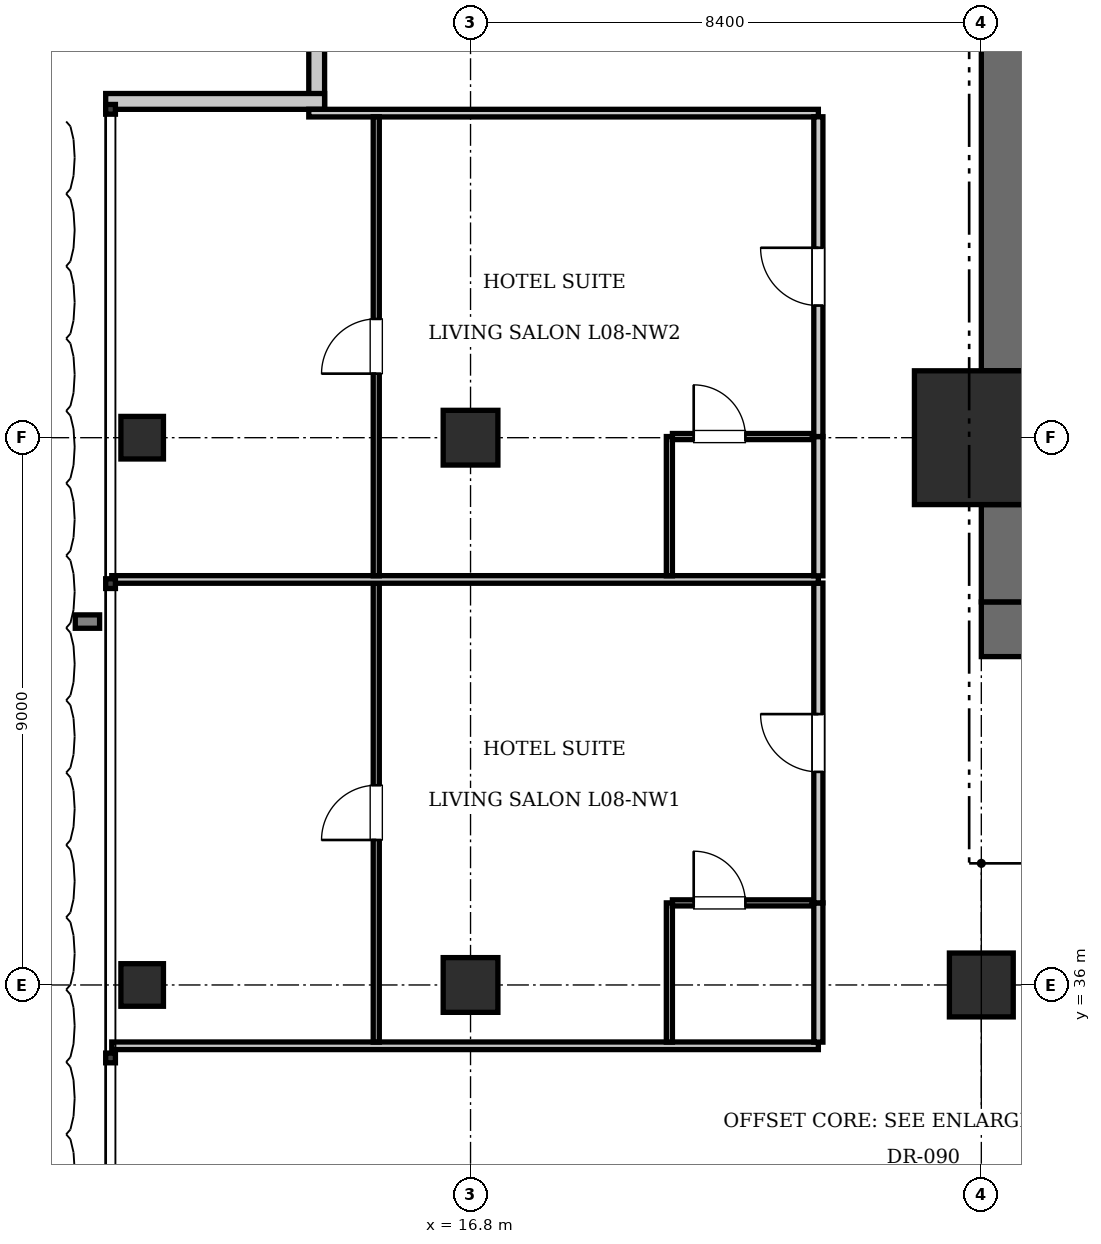
"""IFC4 building model, lengths in metres.
Left out: names, types, materials, properties, quantities, classifications, styles, units other than length and angle.
Written with IfcOpenShell. Run it as: python <this file> out.ifc"""

import sys

from ifc_helpers import new_model, si_unit, direction, frame, frame_2d, origin, origin_2d, place, context, subcontext, project, spatial, rectangle, i_section, extrude, element, fill, save


model = new_model("IFC4")
c1 = context("Model", 3, precision=1e-05, world=origin(), true_north=direction((0.0, 1.0)))
c2 = subcontext(c1, "Body", "Model", "MODEL_VIEW")
j1 = project(units=[si_unit("LENGTHUNIT", "METRE"), si_unit("PLANEANGLEUNIT", "RADIAN")], contexts=[c1])
p1 = place(None, origin())
s1 = spatial("IfcSite", under=j1, at=p1, CompositionType="ELEMENT")
p2 = place(p1, origin())
s2 = spatial("IfcBuilding", under=s1, at=p2, CompositionType="ELEMENT")
p3 = place(p2, frame((0.0, 0.0, 38.5)))
s3 = spatial("IfcBuildingStorey", under=s2, at=p3, CompositionType="ELEMENT", Elevation=38.5)
p4 = place(p3, frame((25.2, 45.0, 0.0), z_axis=(0.0, 0.0, 1.0), x_axis=(1.0, 0.0, 0.0)))
e1 = element("IfcColumn", 1, at=p4, inside=s3, PredefinedType="COLUMN", context=c2, shape_type="SweptSolid", body=[
    extrude(rectangle(XDim=2.2, YDim=2.2, at=origin_2d()), origin(), (0.0, 0.0, 1.0), 3.85),
])
p5 = place(p3, frame((25.2, 41.85, 0.0), z_axis=(0.0, 0.0, 1.0), x_axis=(1.0, 0.0, 0.0)))
e2 = element("IfcWall", 2, at=p5, inside=s3, PredefinedType="SHEAR", context=c2, shape_type="SweptSolid", body=[
    extrude(rectangle(XDim=6.8, YDim=0.9, at=frame_2d((3.4, 0.0))), origin(), (0.0, 0.0, 1.0), 3.85),
])
p6 = place(p5, frame((1.65, 0.0, 0.0)))
e3 = element("IfcOpeningElement", 3, at=p6, cuts=e2, PredefinedType="OPENING", context=c2, shape_type="SweptSolid", body=[
    extrude(rectangle(XDim=1.15, YDim=2.15, at=frame_2d((0.575, 1.075))), frame((0.0, 0.46, 0.0), z_axis=(0.0, -1.0, 0.0), x_axis=(1.0, 0.0, 0.0)), (0.0, 0.0, 1.0), 0.92),
])
p7 = place(p5, frame((5.15, 0.0, 0.0)))
e4 = element("IfcOpeningElement", 4, at=p7, cuts=e2, PredefinedType="OPENING", context=c2, shape_type="SweptSolid", body=[
    extrude(rectangle(XDim=1.1, YDim=2.2, at=frame_2d((0.55, 1.1))), frame((0.0, 0.46, 0.0), z_axis=(0.0, -1.0, 0.0), x_axis=(1.0, 0.0, 0.0)), (0.0, 0.0, 1.0), 0.92),
])
p8 = place(p3, frame((25.65, 42.3, 0.0), z_axis=(0.0, 0.0, 1.0), x_axis=(0.0, 1.0, 0.0)))
e5 = element("IfcWall", 5, at=p8, inside=s3, PredefinedType="SHEAR", context=c2, shape_type="SweptSolid", body=[
    extrude(rectangle(XDim=1.6, YDim=0.9, at=frame_2d((0.8, 0.0))), origin(), (0.0, 0.0, 1.0), 3.85),
])
p9 = place(p3, frame((25.65, 46.1, 0.0), z_axis=(0.0, 0.0, 1.0), x_axis=(0.0, 1.0, 0.0)))
e6 = element("IfcWall", 6, at=p9, inside=s3, PredefinedType="SHEAR", context=c2, shape_type="SweptSolid", body=[
    extrude(rectangle(XDim=7.0, YDim=0.9, at=frame_2d((3.5, 0.0))), origin(), (0.0, 0.0, 1.0), 3.85),
])
p10 = place(p3, frame((25.2, 36.0, 0.0), z_axis=(0.0, 0.0, 1.0), x_axis=(1.0, 0.0, 0.0)))
e7 = element("IfcColumn", 7, at=p10, inside=s3, PredefinedType="COLUMN", context=c2, shape_type="SweptSolid", body=[
    extrude(rectangle(XDim=1.05, YDim=1.05, at=origin_2d()), origin(), (0.0, 0.0, 1.0), 3.85),
])
for number, where, z_axis, x_axis in (
    (8, (16.8, 36.0, 0.0), (0.0, 0.0, 1.0), (1.0, 0.0, 0.0)),
    (9, (16.8, 45.0, 0.0), (0.0, 0.0, 1.0), (1.0, 0.0, 0.0)),
):
    element("IfcColumn", number, at=place(p3, frame(where, z_axis=z_axis, x_axis=x_axis)), inside=s3, PredefinedType="COLUMN", context=c2, shape_type="SweptSolid", body=[
        extrude(rectangle(XDim=0.9, YDim=0.9, at=origin_2d()), origin(), (0.0, 0.0, 1.0), 3.85),
    ])
for number, where, z_axis, x_axis in (
    (10, (11.4, 36.0, 0.0), (0.0, 0.0, 1.0), (1.0, 0.0, 0.0)),
    (11, (11.4, 45.0, 0.0), (0.0, 0.0, 1.0), (1.0, 0.0, 0.0)),
):
    element("IfcColumn", number, at=place(p3, frame(where, z_axis=z_axis, x_axis=x_axis)), inside=s3, PredefinedType="COLUMN", context=c2, shape_type="SweptSolid", body=[
        extrude(i_section(OverallWidth=0.7, OverallDepth=0.7, WebThickness=0.028, FlangeThickness=0.044, at=origin_2d()), origin(), (0.0, 0.0, 1.0), 3.85),
    ])
p11 = place(p3, frame((14.27, 50.4, 0.0), z_axis=(0.0, 0.0, 1.0), x_axis=(0.0, 1.0, 0.0)))
e12 = element("IfcWall", 12, at=p11, inside=s3, PredefinedType="SOLIDWALL", context=c2, shape_type="SweptSolid", body=[
    extrude(rectangle(XDim=3.6, YDim=0.26, at=frame_2d((1.8, 0.0))), origin(), (0.0, 0.0, 1.0), 3.61),
])
p12 = place(p3, frame((10.8, 50.53, 0.0), z_axis=(0.0, 0.0, 1.0), x_axis=(1.0, 0.0, 0.0)))
e13 = element("IfcWall", 13, at=p12, inside=s3, PredefinedType="SOLIDWALL", context=c2, shape_type="SweptSolid", body=[
    extrude(rectangle(XDim=3.6, YDim=0.26, at=frame_2d((1.8, 0.0))), origin(), (0.0, 0.0, 1.0), 3.61),
])
p13 = place(p3, frame((10.9, 35.0, 0.0), z_axis=(0.0, 0.0, 1.0), x_axis=(1.0, 0.0, 0.0)))
e14 = element("IfcWall", 14, at=p13, inside=s3, PredefinedType="PARTITIONING", context=c2, shape_type="SweptSolid", body=[
    extrude(rectangle(XDim=11.62, YDim=0.125, at=frame_2d((5.81, 0.0))), origin(), (0.0, 0.0, 1.0), 3.61),
])
p14 = place(p3, frame((14.14, 50.337, 0.0), z_axis=(0.0, 0.0, 1.0), x_axis=(1.0, 0.0, 0.0)))
e15 = element("IfcWall", 15, at=p14, inside=s3, PredefinedType="PARTITIONING", context=c2, shape_type="SweptSolid", body=[
    extrude(rectangle(XDim=8.38, YDim=0.125, at=frame_2d((4.19, 0.0))), origin(), (0.0, 0.0, 1.0), 3.61),
])
p15 = place(p3, frame((22.52, 35.06, 0.0), z_axis=(0.0, 0.0, 1.0), x_axis=(0.0, 1.0, 0.0)))
e16 = element("IfcWall", 16, at=p15, inside=s3, PredefinedType="PARTITIONING", context=c2, shape_type="SweptSolid", body=[
    extrude(rectangle(XDim=2.29, YDim=0.15, at=frame_2d((1.145, 0.0))), origin(), (0.0, 0.0, 1.0), 3.61),
])
p16 = place(p3, frame((22.52, 37.35, 0.0), z_axis=(0.0, 0.0, 1.0), x_axis=(0.0, 1.0, 0.0)))
e17 = element("IfcWall", 17, at=p16, inside=s3, PredefinedType="PARTITIONING", context=c2, shape_type="SweptSolid", body=[
    extrude(rectangle(XDim=5.259, YDim=0.15, at=frame_2d((2.629, 0.0))), origin(), (0.0, 0.0, 1.0), 3.61),
])
p17 = place(p16, frame((2.154, 0.0, 0.0)))
e18 = element("IfcOpeningElement", 18, at=p17, cuts=e17, PredefinedType="OPENING", context=c2, shape_type="SweptSolid", body=[
    extrude(rectangle(XDim=0.95, YDim=2.15, at=frame_2d((0.475, 1.075))), frame((0.0, 0.085, 0.0), z_axis=(0.0, -1.0, 0.0), x_axis=(1.0, 0.0, 0.0)), (0.0, 0.0, 1.0), 0.17),
])
p18 = place(p3, frame((20.07, 35.06, 0.0), z_axis=(0.0, 0.0, 1.0), x_axis=(0.0, 1.0, 0.0)))
e19 = element("IfcWall", 19, at=p18, inside=s3, PredefinedType="PARTITIONING", context=c2, shape_type="SweptSolid", body=[
    extrude(rectangle(XDim=2.29, YDim=0.1, at=frame_2d((1.145, 0.0))), origin(), (0.0, 0.0, 1.0), 3.61),
])
p19 = place(p3, frame((20.12, 37.35, 0.0), z_axis=(0.0, 0.0, 1.0), x_axis=(1.0, 0.0, 0.0)))
e20 = element("IfcWall", 20, at=p19, inside=s3, PredefinedType="PARTITIONING", context=c2, shape_type="SweptSolid", body=[
    extrude(rectangle(XDim=2.3, YDim=0.1, at=frame_2d((1.15, 0.0))), origin(), (0.0, 0.0, 1.0), 3.61),
])
p20 = place(p19, frame((0.35, 0.0, 0.0)))
e21 = element("IfcOpeningElement", 21, at=p20, cuts=e20, PredefinedType="OPENING", context=c2, shape_type="SweptSolid", body=[
    extrude(rectangle(XDim=0.85, YDim=2.1, at=frame_2d((0.425, 1.05))), frame((0.0, 0.06, 0.0), z_axis=(0.0, -1.0, 0.0), x_axis=(1.0, 0.0, 0.0)), (0.0, 0.0, 1.0), 0.12),
])
p21 = place(p3, frame((15.25, 35.06, 0.0), z_axis=(0.0, 0.0, 1.0), x_axis=(0.0, 1.0, 0.0)))
e22 = element("IfcWall", 22, at=p21, inside=s3, PredefinedType="PARTITIONING", context=c2, shape_type="SweptSolid", body=[
    extrude(rectangle(XDim=7.549, YDim=0.1, at=frame_2d((3.774, 0.0))), origin(), (0.0, 0.0, 1.0), 3.61),
])
p22 = place(p21, frame((3.324, 0.0, 0.0)))
e23 = element("IfcOpeningElement", 23, at=p22, cuts=e22, PredefinedType="OPENING", context=c2, shape_type="SweptSolid", body=[
    extrude(rectangle(XDim=0.9, YDim=2.1, at=frame_2d((0.45, 1.05))), frame((0.0, 0.06, 0.0), z_axis=(0.0, -1.0, 0.0), x_axis=(1.0, 0.0, 0.0)), (0.0, 0.0, 1.0), 0.12),
])
p23 = place(p3, frame((10.9, 42.669, 0.0), z_axis=(0.0, 0.0, 1.0), x_axis=(1.0, 0.0, 0.0)))
e24 = element("IfcWall", 24, at=p23, inside=s3, PredefinedType="PARTITIONING", context=c2, shape_type="SweptSolid", body=[
    extrude(rectangle(XDim=11.62, YDim=0.125, at=frame_2d((5.81, 0.0))), origin(), (0.0, 0.0, 1.0), 3.61),
])
p24 = place(p3, frame((22.52, 42.729, 0.0), z_axis=(0.0, 0.0, 1.0), x_axis=(0.0, 1.0, 0.0)))
e25 = element("IfcWall", 25, at=p24, inside=s3, PredefinedType="PARTITIONING", context=c2, shape_type="SweptSolid", body=[
    extrude(rectangle(XDim=2.29, YDim=0.15, at=frame_2d((1.145, 0.0))), origin(), (0.0, 0.0, 1.0), 3.61),
])
p25 = place(p3, frame((22.52, 45.019, 0.0), z_axis=(0.0, 0.0, 1.0), x_axis=(0.0, 1.0, 0.0)))
e26 = element("IfcWall", 26, at=p25, inside=s3, PredefinedType="PARTITIONING", context=c2, shape_type="SweptSolid", body=[
    extrude(rectangle(XDim=5.259, YDim=0.15, at=frame_2d((2.629, 0.0))), origin(), (0.0, 0.0, 1.0), 3.61),
])
p26 = place(p25, frame((2.154, 0.0, 0.0)))
e27 = element("IfcOpeningElement", 27, at=p26, cuts=e26, PredefinedType="OPENING", context=c2, shape_type="SweptSolid", body=[
    extrude(rectangle(XDim=0.95, YDim=2.15, at=frame_2d((0.475, 1.075))), frame((0.0, 0.085, 0.0), z_axis=(0.0, -1.0, 0.0), x_axis=(1.0, 0.0, 0.0)), (0.0, 0.0, 1.0), 0.17),
])
p27 = place(p3, frame((20.07, 42.729, 0.0), z_axis=(0.0, 0.0, 1.0), x_axis=(0.0, 1.0, 0.0)))
e28 = element("IfcWall", 28, at=p27, inside=s3, PredefinedType="PARTITIONING", context=c2, shape_type="SweptSolid", body=[
    extrude(rectangle(XDim=2.29, YDim=0.1, at=frame_2d((1.145, 0.0))), origin(), (0.0, 0.0, 1.0), 3.61),
])
p28 = place(p3, frame((20.12, 45.019, 0.0), z_axis=(0.0, 0.0, 1.0), x_axis=(1.0, 0.0, 0.0)))
e29 = element("IfcWall", 29, at=p28, inside=s3, PredefinedType="PARTITIONING", context=c2, shape_type="SweptSolid", body=[
    extrude(rectangle(XDim=2.3, YDim=0.1, at=frame_2d((1.15, 0.0))), origin(), (0.0, 0.0, 1.0), 2.988),
])
p29 = place(p28, frame((0.35, 0.0, 0.0)))
e30 = element("IfcOpeningElement", 30, at=p29, cuts=e29, PredefinedType="OPENING", context=c2, shape_type="SweptSolid", body=[
    extrude(rectangle(XDim=0.85, YDim=2.1, at=frame_2d((0.425, 1.05))), frame((0.0, 0.06, 0.0), z_axis=(0.0, -1.0, 0.0), x_axis=(1.0, 0.0, 0.0)), (0.0, 0.0, 1.0), 0.12),
])
p30 = place(p3, frame((15.25, 42.729, 0.0), z_axis=(0.0, 0.0, 1.0), x_axis=(0.0, 1.0, 0.0)))
e31 = element("IfcWall", 31, at=p30, inside=s3, PredefinedType="PARTITIONING", context=c2, shape_type="SweptSolid", body=[
    extrude(rectangle(XDim=7.549, YDim=0.1, at=frame_2d((3.774, 0.0))), origin(), (0.0, 0.0, 1.0), 3.61),
])
p31 = place(p30, frame((3.324, 0.0, 0.0)))
e32 = element("IfcOpeningElement", 32, at=p31, cuts=e31, PredefinedType="OPENING", context=c2, shape_type="SweptSolid", body=[
    extrude(rectangle(XDim=0.9, YDim=2.1, at=frame_2d((0.45, 1.05))), frame((0.0, 0.06, 0.0), z_axis=(0.0, -1.0, 0.0), x_axis=(1.0, 0.0, 0.0)), (0.0, 0.0, 1.0), 0.12),
])
p32 = place(p20, origin())
e33 = element("IfcDoor", 33, at=p32, inside=s3, OperationType="SINGLE_SWING_LEFT", PredefinedType="DOOR", context=c2, shape_type="SweptSolid", body=[
    extrude(rectangle(XDim=0.85, YDim=2.1, at=frame_2d((0.425, 1.05))), frame((0.0, 0.025, 0.0), z_axis=(0.0, -1.0, 0.0), x_axis=(1.0, 0.0, 0.0)), (0.0, 0.0, 1.0), 0.05),
])
fill(e21, e33)
p33 = place(p17, origin())
e34 = element("IfcDoor", 34, at=p33, inside=s3, OperationType="SINGLE_SWING_RIGHT", PredefinedType="DOOR", context=c2, shape_type="SweptSolid", body=[
    extrude(rectangle(XDim=0.95, YDim=2.15, at=frame_2d((0.475, 1.075))), frame((0.0, 0.025, 0.0), z_axis=(0.0, -1.0, 0.0), x_axis=(1.0, 0.0, 0.0)), (0.0, 0.0, 1.0), 0.05),
])
fill(e18, e34)
p34 = place(p22, origin())
e35 = element("IfcDoor", 35, at=p34, inside=s3, OperationType="SINGLE_SWING_LEFT", PredefinedType="DOOR", context=c2, shape_type="SweptSolid", body=[
    extrude(rectangle(XDim=0.9, YDim=2.1, at=frame_2d((0.45, 1.05))), frame((0.0, 0.025, 0.0), z_axis=(0.0, -1.0, 0.0), x_axis=(1.0, 0.0, 0.0)), (0.0, 0.0, 1.0), 0.05),
])
fill(e23, e35)
p35 = place(p29, origin())
e36 = element("IfcDoor", 36, at=p35, inside=s3, OperationType="SINGLE_SWING_LEFT", PredefinedType="DOOR", context=c2, shape_type="SweptSolid", body=[
    extrude(rectangle(XDim=0.85, YDim=2.1, at=frame_2d((0.425, 1.05))), frame((0.0, 0.025, 0.0), z_axis=(0.0, -1.0, 0.0), x_axis=(1.0, 0.0, 0.0)), (0.0, 0.0, 1.0), 0.05),
])
fill(e30, e36)
p36 = place(p26, origin())
e37 = element("IfcDoor", 37, at=p36, inside=s3, OperationType="SINGLE_SWING_RIGHT", PredefinedType="DOOR", context=c2, shape_type="SweptSolid", body=[
    extrude(rectangle(XDim=0.95, YDim=2.15, at=frame_2d((0.475, 1.075))), frame((0.0, 0.025, 0.0), z_axis=(0.0, -1.0, 0.0), x_axis=(1.0, 0.0, 0.0)), (0.0, 0.0, 1.0), 0.05),
])
fill(e27, e37)
p37 = place(p31, origin())
e38 = element("IfcDoor", 38, at=p37, inside=s3, OperationType="SINGLE_SWING_LEFT", PredefinedType="DOOR", context=c2, shape_type="SweptSolid", body=[
    extrude(rectangle(XDim=0.9, YDim=2.1, at=frame_2d((0.45, 1.05))), frame((0.0, 0.025, 0.0), z_axis=(0.0, -1.0, 0.0), x_axis=(1.0, 0.0, 0.0)), (0.0, 0.0, 1.0), 0.05),
])
fill(e32, e38)
save(model, sys.argv[1])
